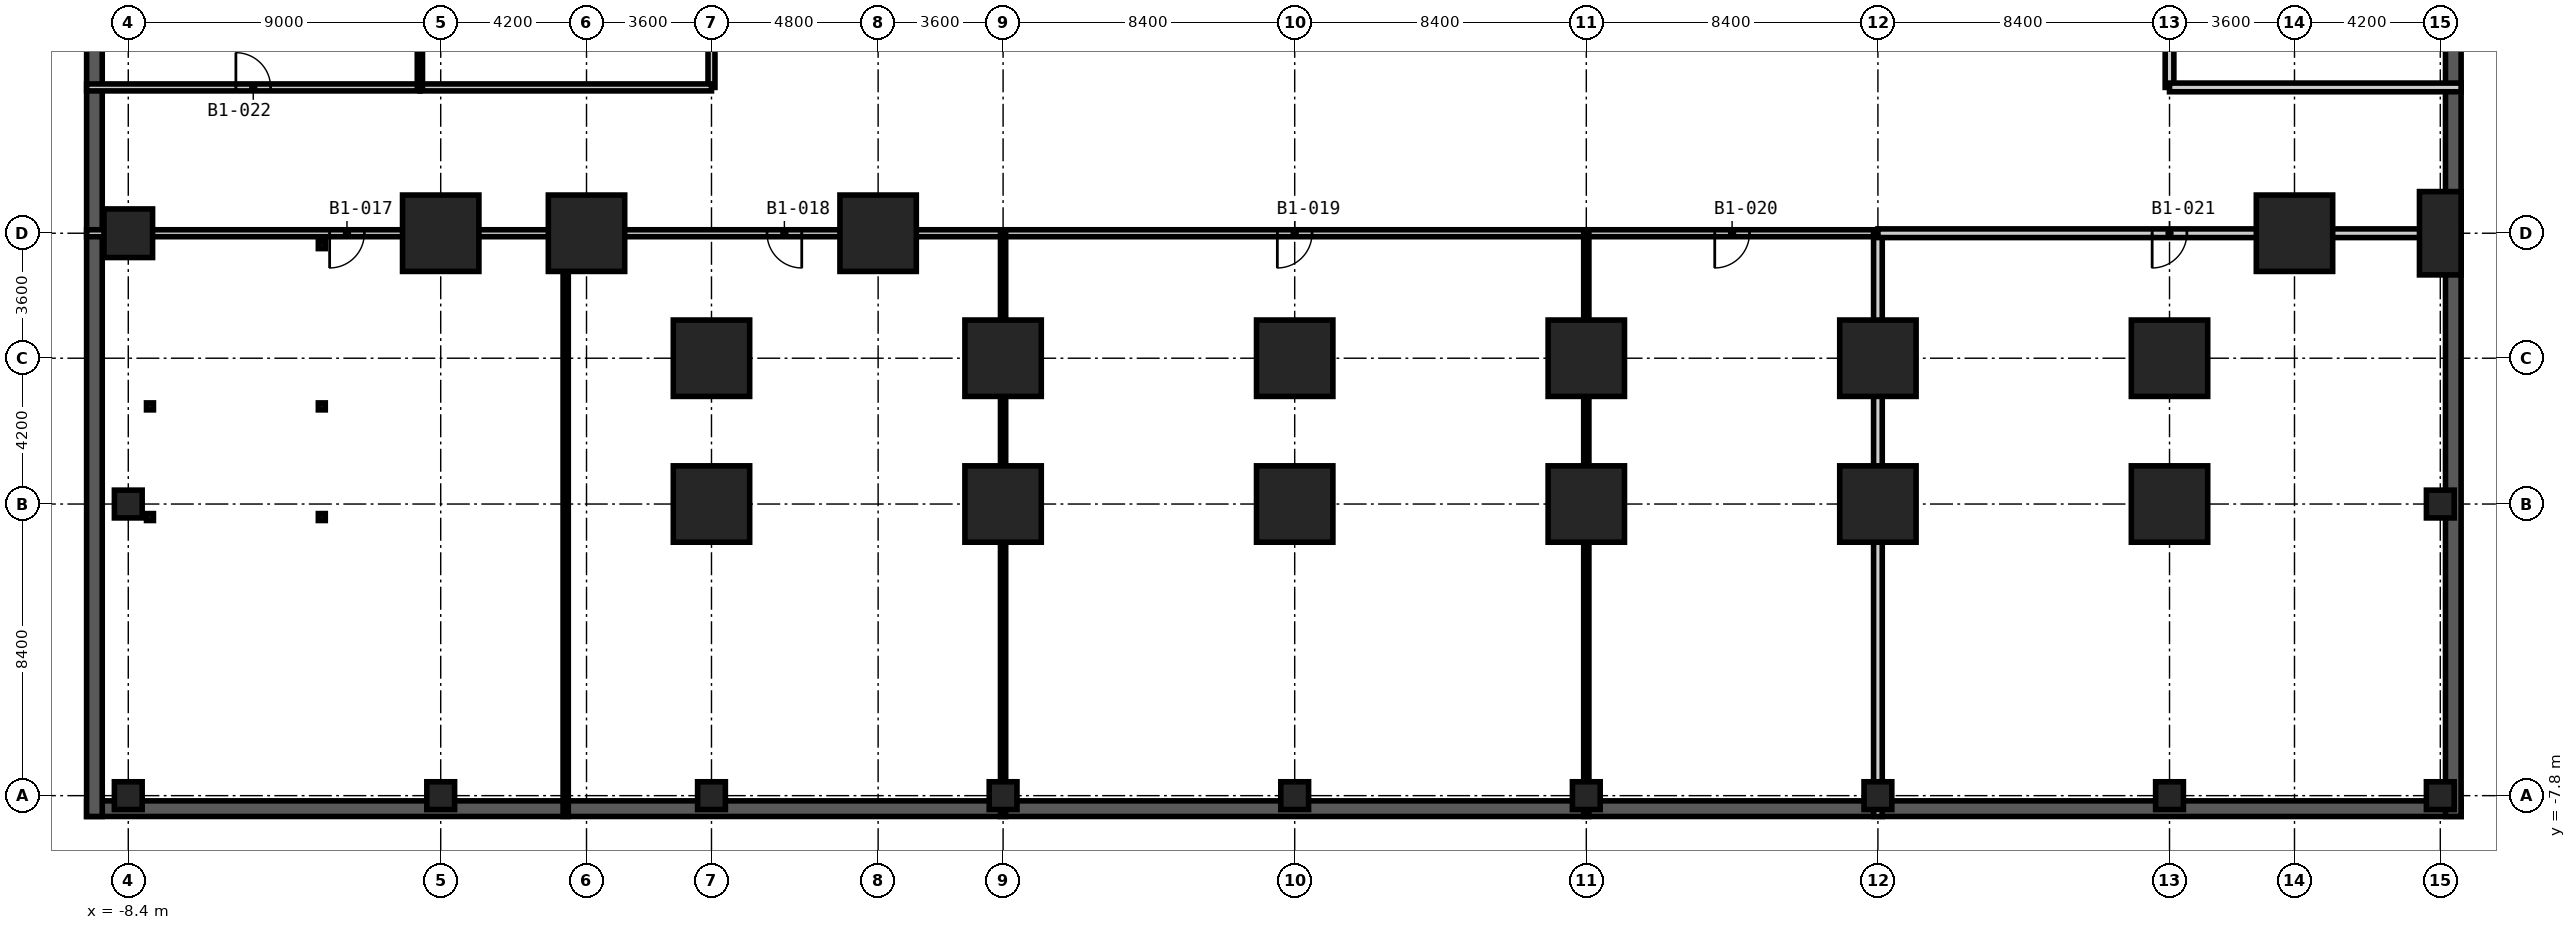
"""IFC4 building model, lengths in metres.
Left out: names, types, materials, properties, quantities, classifications, styles, units other than length and angle.
Written with IfcOpenShell. Run it as: python <this file> out.ifc"""

import sys

from ifc_helpers import new_model, si_unit, direction, frame, frame_2d, origin, origin_2d, place, context, subcontext, project, spatial, rectangle, hollow_rectangle, extrude, element, fill, save


model = new_model("IFC4")
c1 = context("Model", 3, precision=1e-05, world=origin(), true_north=direction((0.0, 1.0)))
c2 = subcontext(c1, "Body", "Model", "MODEL_VIEW")
j1 = project(units=[si_unit("LENGTHUNIT", "METRE"), si_unit("PLANEANGLEUNIT", "RADIAN")], contexts=[c1])
p1 = place(None, origin())
s1 = spatial("IfcSite", under=j1, at=p1, CompositionType="ELEMENT")
p2 = place(p1, origin())
s2 = spatial("IfcBuilding", under=s1, at=p2, CompositionType="ELEMENT")
p3 = place(p2, frame((0.0, 0.0, -5.4)))
s3 = spatial("IfcBuildingStorey", under=s2, at=p3, CompositionType="ELEMENT", Elevation=-5.4)
for number, where, z_axis, x_axis in (
    (1, (0.6, 8.4, 0.0), (0.0, 0.0, 1.0), (1.0, 0.0, 0.0)),
    (2, (4.8, 8.4, 0.0), (0.0, 0.0, 1.0), (1.0, 0.0, 0.0)),
    (3, (8.4, 0.6, 0.0), (0.0, 0.0, 1.0), (1.0, 0.0, 0.0)),
    (4, (8.4, 4.8, 0.0), (0.0, 0.0, 1.0), (1.0, 0.0, 0.0)),
    (5, (13.2, 8.4, 0.0), (0.0, 0.0, 1.0), (1.0, 0.0, 0.0)),
    (6, (16.8, 0.6, 0.0), (0.0, 0.0, 1.0), (1.0, 0.0, 0.0)),
    (7, (16.8, 4.8, 0.0), (0.0, 0.0, 1.0), (1.0, 0.0, 0.0)),
    (8, (25.2, 0.6, 0.0), (0.0, 0.0, 1.0), (1.0, 0.0, 0.0)),
    (9, (25.2, 4.8, 0.0), (0.0, 0.0, 1.0), (1.0, 0.0, 0.0)),
    (10, (33.6, 0.6, 0.0), (0.0, 0.0, 1.0), (1.0, 0.0, 0.0)),
    (11, (33.6, 4.8, 0.0), (0.0, 0.0, 1.0), (1.0, 0.0, 0.0)),
    (12, (42.0, 0.6, 0.0), (0.0, 0.0, 1.0), (1.0, 0.0, 0.0)),
    (13, (42.0, 4.8, 0.0), (0.0, 0.0, 1.0), (1.0, 0.0, 0.0)),
    (14, (50.4, 0.6, 0.0), (0.0, 0.0, 1.0), (1.0, 0.0, 0.0)),
    (15, (50.4, 4.8, 0.0), (0.0, 0.0, 1.0), (1.0, 0.0, 0.0)),
    (16, (54.0, 8.4, 0.0), (0.0, 0.0, 1.0), (1.0, 0.0, 0.0)),
):
    element("IfcColumn", number, at=place(p3, frame(where, z_axis=z_axis, x_axis=x_axis)), inside=s3, PredefinedType="COLUMN", context=c2, shape_type="SweptSolid", body=[
        extrude(rectangle(XDim=2.2, YDim=2.2, at=origin_2d()), origin(), (0.0, 0.0, 1.0), 5.1),
    ])
p4 = place(p3, frame((58.2, 8.4, 0.0), z_axis=(0.0, 0.0, 1.0), x_axis=(1.0, 0.0, 0.0)))
e17 = element("IfcColumn", 17, at=p4, inside=s3, PredefinedType="COLUMN", context=c2, shape_type="SweptSolid", body=[
    extrude(rectangle(XDim=1.2, YDim=2.4, at=origin_2d()), origin(), (0.0, 0.0, 1.0), 5.1),
])
for number, where, z_axis, x_axis in (
    (18, (-8.4, -7.8, -0.3), (0.0, 0.0, 1.0), (1.0, 0.0, 0.0)),
    (19, (-8.4, 0.6, -0.3), (0.0, 0.0, 1.0), (1.0, 0.0, 0.0)),
):
    element("IfcColumn", number, at=place(p3, frame(where, z_axis=z_axis, x_axis=x_axis)), inside=s3, PredefinedType="COLUMN", context=c2, shape_type="SweptSolid", body=[
        extrude(rectangle(XDim=0.8, YDim=0.8, at=origin_2d()), origin(), (0.0, 0.0, 1.0), 5.4),
    ])
p5 = place(p3, frame((-8.4, 8.4, -0.3), z_axis=(0.0, 0.0, 1.0), x_axis=(1.0, 0.0, 0.0)))
e20 = element("IfcColumn", 20, at=p5, inside=s3, PredefinedType="COLUMN", context=c2, shape_type="SweptSolid", body=[
    extrude(rectangle(XDim=1.4, YDim=1.4, at=origin_2d()), origin(), (0.0, 0.0, 1.0), 5.4),
])
for number, where, z_axis, x_axis in (
    (21, (0.6, -7.8, -0.3), (0.0, 0.0, 1.0), (1.0, 0.0, 0.0)),
    (22, (8.4, -7.8, -0.3), (0.0, 0.0, 1.0), (1.0, 0.0, 0.0)),
    (23, (16.8, -7.8, -0.3), (0.0, 0.0, 1.0), (1.0, 0.0, 0.0)),
    (24, (25.2, -7.8, -0.3), (0.0, 0.0, 1.0), (1.0, 0.0, 0.0)),
    (25, (33.6, -7.8, -0.3), (0.0, 0.0, 1.0), (1.0, 0.0, 0.0)),
    (26, (42.0, -7.8, -0.3), (0.0, 0.0, 1.0), (1.0, 0.0, 0.0)),
    (27, (50.4, -7.8, -0.3), (0.0, 0.0, 1.0), (1.0, 0.0, 0.0)),
    (28, (58.2, -7.8, -0.3), (0.0, 0.0, 1.0), (1.0, 0.0, 0.0)),
    (29, (58.2, 0.6, -0.3), (0.0, 0.0, 1.0), (1.0, 0.0, 0.0)),
):
    element("IfcColumn", number, at=place(p3, frame(where, z_axis=z_axis, x_axis=x_axis)), inside=s3, PredefinedType="COLUMN", context=c2, shape_type="SweptSolid", body=[
        extrude(rectangle(XDim=0.8, YDim=0.8, at=origin_2d()), origin(), (0.0, 0.0, 1.0), 5.4),
    ])
p6 = place(p3, frame((-9.6, -8.175, 0.0), z_axis=(0.0, 0.0, 1.0), x_axis=(1.0, 0.0, 0.0)))
e30 = element("IfcWall", 30, at=p6, inside=s3, PredefinedType="SOLIDWALL", context=c2, shape_type="SweptSolid", body=[
    extrude(rectangle(XDim=68.4, YDim=0.45, at=frame_2d((34.2, 0.0))), origin(), (0.0, 0.0, 1.0), 5.1),
])
for number, where, z_axis, x_axis in (
    (31, (58.575, -8.4, 0.0), (0.0, 0.0, 1.0), (0.0, 1.0, 0.0)),
    (32, (-9.375, 58.8, 0.0), (0.0, 0.0, 1.0), (0.0, -1.0, 0.0)),
):
    element("IfcWall", number, at=place(p3, frame(where, z_axis=z_axis, x_axis=x_axis)), inside=s3, PredefinedType="SOLIDWALL", context=c2, shape_type="SweptSolid", body=[
        extrude(rectangle(XDim=67.2, YDim=0.45, at=frame_2d((33.6, 0.0))), origin(), (0.0, 0.0, 1.0), 5.1),
    ])
p7 = place(p3, frame((-9.6, 8.4, 0.0), z_axis=(0.0, 0.0, 1.0), x_axis=(1.0, 0.0, 0.0)))
e33 = element("IfcWall", 33, at=p7, inside=s3, PredefinedType="PARTITIONING", context=c2, shape_type="SweptSolid", body=[
    extrude(rectangle(XDim=51.6, YDim=0.2, at=frame_2d((25.8, 0.0))), origin(), (0.0, 0.0, 1.0), 5.1),
])
p8 = place(p7, frame((7.0, 0.0, 0.0)))
e34 = element("IfcOpeningElement", 34, at=p8, cuts=e33, PredefinedType="OPENING", context=c2, shape_type="SweptSolid", body=[
    extrude(rectangle(XDim=1.0, YDim=2.1, at=frame_2d((0.5, 1.05))), frame((0.0, 0.11, 0.0), z_axis=(0.0, -1.0, 0.0), x_axis=(1.0, 0.0, 0.0)), (0.0, 0.0, 1.0), 0.22),
])
p9 = place(p7, frame((19.6, 0.0, 0.0)))
e35 = element("IfcOpeningElement", 35, at=p9, cuts=e33, PredefinedType="OPENING", context=c2, shape_type="SweptSolid", body=[
    extrude(rectangle(XDim=1.0, YDim=2.1, at=frame_2d((0.5, 1.05))), frame((0.0, 0.11, 0.0), z_axis=(0.0, -1.0, 0.0), x_axis=(1.0, 0.0, 0.0)), (0.0, 0.0, 1.0), 0.22),
])
p10 = place(p7, frame((34.3, 0.0, 0.0)))
e36 = element("IfcOpeningElement", 36, at=p10, cuts=e33, PredefinedType="OPENING", context=c2, shape_type="SweptSolid", body=[
    extrude(rectangle(XDim=1.0, YDim=2.1, at=frame_2d((0.5, 1.05))), frame((0.0, 0.11, 0.0), z_axis=(0.0, -1.0, 0.0), x_axis=(1.0, 0.0, 0.0)), (0.0, 0.0, 1.0), 0.22),
])
p11 = place(p7, frame((46.9, 0.0, 0.0)))
e37 = element("IfcOpeningElement", 37, at=p11, cuts=e33, PredefinedType="OPENING", context=c2, shape_type="SweptSolid", body=[
    extrude(rectangle(XDim=1.0, YDim=2.1, at=frame_2d((0.5, 1.05))), frame((0.0, 0.11, 0.0), z_axis=(0.0, -1.0, 0.0), x_axis=(1.0, 0.0, 0.0)), (0.0, 0.0, 1.0), 0.22),
])
p12 = place(p3, frame((-9.6, 12.6, 0.0), z_axis=(0.0, 0.0, 1.0), x_axis=(1.0, 0.0, 0.0)))
e38 = element("IfcWall", 38, at=p12, inside=s3, PredefinedType="PARTITIONING", context=c2, shape_type="SweptSolid", body=[
    extrude(rectangle(XDim=9.6, YDim=0.2, at=frame_2d((4.8, 0.0))), origin(), (0.0, 0.0, 1.0), 5.1),
])
p13 = place(p12, frame((4.3, 0.0, 0.0)))
e39 = element("IfcOpeningElement", 39, at=p13, cuts=e38, PredefinedType="OPENING", context=c2, shape_type="SweptSolid", body=[
    extrude(rectangle(XDim=1.0, YDim=2.1, at=frame_2d((0.5, 1.05))), frame((0.0, 0.11, 0.0), z_axis=(0.0, -1.0, 0.0), x_axis=(1.0, 0.0, 0.0)), (0.0, 0.0, 1.0), 0.22),
])
p14 = place(p3, frame((8.4, 33.6, 0.0), z_axis=(0.0, 0.0, 1.0), x_axis=(0.0, -1.0, 0.0)))
e40 = element("IfcWall", 40, at=p14, inside=s3, PredefinedType="PARTITIONING", context=c2, shape_type="SweptSolid", body=[
    extrude(rectangle(XDim=21.0, YDim=0.2, at=frame_2d((10.5, 0.0))), origin(), (0.0, 0.0, 1.0), 5.1),
])
p15 = place(p14, frame((10.0, 0.0, 0.0)))
e41 = element("IfcOpeningElement", 41, at=p15, cuts=e40, PredefinedType="OPENING", context=c2, shape_type="SweptSolid", body=[
    extrude(rectangle(XDim=1.0, YDim=2.1, at=frame_2d((0.5, 1.05))), frame((0.0, 0.11, 0.0), z_axis=(0.0, -1.0, 0.0), x_axis=(1.0, 0.0, 0.0)), (0.0, 0.0, 1.0), 0.22),
])
p16 = place(p3, frame((8.4, 12.6, 0.0), z_axis=(0.0, 0.0, 1.0), x_axis=(-1.0, 0.0, 0.0)))
e42 = element("IfcWall", 42, at=p16, inside=s3, PredefinedType="PARTITIONING", context=c2, shape_type="SweptSolid", body=[
    extrude(rectangle(XDim=8.4, YDim=0.2, at=frame_2d((4.2, 0.0))), origin(), (0.0, 0.0, 1.0), 5.1),
])
p17 = place(p3, frame((42.0, -8.4, 0.0), z_axis=(0.0, 0.0, 1.0), x_axis=(0.0, 1.0, 0.0)))
e43 = element("IfcWall", 43, at=p17, inside=s3, PredefinedType="PARTITIONING", context=c2, shape_type="SweptSolid", body=[
    extrude(rectangle(XDim=16.8, YDim=0.25, at=frame_2d((8.4, 0.0))), origin(), (0.0, 0.0, 1.0), 5.1),
])
p18 = place(p3, frame((50.4, 12.6, 0.0), z_axis=(0.0, 0.0, 1.0), x_axis=(0.0, 1.0, 0.0)))
e44 = element("IfcWall", 44, at=p18, inside=s3, PredefinedType="PARTITIONING", context=c2, shape_type="SweptSolid", body=[
    extrude(rectangle(XDim=33.6, YDim=0.25, at=frame_2d((16.8, 0.0))), origin(), (0.0, 0.0, 1.0), 5.1),
])
p19 = place(p18, frame((7.9, 0.0, 0.0)))
e45 = element("IfcOpeningElement", 45, at=p19, cuts=e44, PredefinedType="OPENING", context=c2, shape_type="SweptSolid", body=[
    extrude(rectangle(XDim=1.0, YDim=2.1, at=frame_2d((0.5, 1.05))), frame((0.0, 0.135, 0.0), z_axis=(0.0, -1.0, 0.0), x_axis=(1.0, 0.0, 0.0)), (0.0, 0.0, 1.0), 0.27),
])
p20 = place(p18, frame((24.7, 0.0, 0.0)))
e46 = element("IfcOpeningElement", 46, at=p20, cuts=e44, PredefinedType="OPENING", context=c2, shape_type="SweptSolid", body=[
    extrude(rectangle(XDim=1.0, YDim=2.1, at=frame_2d((0.5, 1.05))), frame((0.0, 0.135, 0.0), z_axis=(0.0, -1.0, 0.0), x_axis=(1.0, 0.0, 0.0)), (0.0, 0.0, 1.0), 0.27),
])
p21 = place(p3, frame((42.0, 8.4, 0.0), z_axis=(0.0, 0.0, 1.0), x_axis=(1.0, 0.0, 0.0)))
e47 = element("IfcWall", 47, at=p21, inside=s3, PredefinedType="PARTITIONING", context=c2, shape_type="SweptSolid", body=[
    extrude(rectangle(XDim=16.8, YDim=0.25, at=frame_2d((8.4, 0.0))), origin(), (0.0, 0.0, 1.0), 5.1),
])
p22 = place(p21, frame((7.9, 0.0, 0.0)))
e48 = element("IfcOpeningElement", 48, at=p22, cuts=e47, PredefinedType="OPENING", context=c2, shape_type="SweptSolid", body=[
    extrude(rectangle(XDim=1.0, YDim=2.1, at=frame_2d((0.5, 1.05))), frame((0.0, 0.135, 0.0), z_axis=(0.0, -1.0, 0.0), x_axis=(1.0, 0.0, 0.0)), (0.0, 0.0, 1.0), 0.27),
])
p23 = place(p3, frame((50.4, 12.6, 0.0), z_axis=(0.0, 0.0, 1.0), x_axis=(1.0, 0.0, 0.0)))
e49 = element("IfcWall", 49, at=p23, inside=s3, PredefinedType="PARTITIONING", context=c2, shape_type="SweptSolid", body=[
    extrude(rectangle(XDim=8.4, YDim=0.25, at=frame_2d((4.2, 0.0))), origin(), (0.0, 0.0, 1.0), 5.1),
])
p24 = place(p3, frame((0.0, 12.6, 0.0), z_axis=(0.0, 0.0, 1.0), x_axis=(0.0, 1.0, 0.0)))
e50 = element("IfcWall", 50, at=p24, inside=s3, PredefinedType="PARTITIONING", context=c2, shape_type="SweptSolid", body=[
    extrude(rectangle(XDim=21.0, YDim=0.15, at=frame_2d((10.5, 0.0))), origin(), (0.0, 0.0, 1.0), 5.1),
])
for number, where, z_axis, x_axis in (
    (51, (4.2, -8.4, 0.0), (0.0, 0.0, 1.0), (0.0, 1.0, 0.0)),
    (52, (16.8, -8.4, 0.0), (0.0, 0.0, 1.0), (0.0, 1.0, 0.0)),
    (53, (33.6, -8.4, 0.0), (0.0, 0.0, 1.0), (0.0, 1.0, 0.0)),
):
    element("IfcWall", number, at=place(p3, frame(where, z_axis=z_axis, x_axis=x_axis)), inside=s3, PredefinedType="PARTITIONING", context=c2, shape_type="SweptSolid", body=[
        extrude(rectangle(XDim=16.8, YDim=0.15, at=frame_2d((8.4, 0.0))), origin(), (0.0, 0.0, 1.0), 5.1),
    ])
for number, where, z_axis, x_axis in (
    (54, (-2.825, 8.058, 0.0), (0.0, 0.0, 1.0), (1.0, 0.0, 0.0)),
    (55, (-7.775, 3.413, 0.0), (0.0, 0.0, 1.0), (1.0, 0.0, 0.0)),
    (56, (-2.825, 3.413, 0.0), (0.0, 0.0, 1.0), (1.0, 0.0, 0.0)),
    (57, (-7.775, 0.225, 0.0), (0.0, 0.0, 1.0), (1.0, 0.0, 0.0)),
    (58, (-2.825, 0.225, 0.0), (0.0, 0.0, 1.0), (1.0, 0.0, 0.0)),
):
    element("IfcColumn", number, at=place(p3, frame(where, z_axis=z_axis, x_axis=x_axis)), inside=s3, PredefinedType="COLUMN", context=c2, shape_type="SweptSolid", body=[
        extrude(hollow_rectangle(XDim=0.2, YDim=0.2, WallThickness=0.01, at=origin_2d()), origin(), (0.0, 0.0, 1.0), 5.1),
    ])
p25 = place(p8, frame((1.0, 0.0, 0.0), z_axis=(0.0, 0.0, 1.0), x_axis=(-1.0, 0.0, 0.0)))
e59 = element("IfcDoor", 59, at=p25, inside=s3, OperationType="SINGLE_SWING_RIGHT", PredefinedType="DOOR", context=c2, shape_type="SweptSolid", body=[
    extrude(rectangle(XDim=1.0, YDim=2.1, at=frame_2d((0.5, 1.05))), frame((0.0, 0.025, 0.0), z_axis=(0.0, -1.0, 0.0), x_axis=(1.0, 0.0, 0.0)), (0.0, 0.0, 1.0), 0.05),
])
fill(e34, e59)
p26 = place(p9, frame((1.0, 0.0, 0.0), z_axis=(0.0, 0.0, 1.0), x_axis=(-1.0, 0.0, 0.0)))
e60 = element("IfcDoor", 60, at=p26, inside=s3, OperationType="SINGLE_SWING_LEFT", PredefinedType="DOOR", context=c2, shape_type="SweptSolid", body=[
    extrude(rectangle(XDim=1.0, YDim=2.1, at=frame_2d((0.5, 1.05))), frame((0.0, 0.025, 0.0), z_axis=(0.0, -1.0, 0.0), x_axis=(1.0, 0.0, 0.0)), (0.0, 0.0, 1.0), 0.05),
])
fill(e35, e60)
p27 = place(p10, frame((1.0, 0.0, 0.0), z_axis=(0.0, 0.0, 1.0), x_axis=(-1.0, 0.0, 0.0)))
e61 = element("IfcDoor", 61, at=p27, inside=s3, OperationType="SINGLE_SWING_RIGHT", PredefinedType="DOOR", context=c2, shape_type="SweptSolid", body=[
    extrude(rectangle(XDim=1.0, YDim=2.1, at=frame_2d((0.5, 1.05))), frame((0.0, 0.025, 0.0), z_axis=(0.0, -1.0, 0.0), x_axis=(1.0, 0.0, 0.0)), (0.0, 0.0, 1.0), 0.05),
])
fill(e36, e61)
p28 = place(p11, frame((1.0, 0.0, 0.0), z_axis=(0.0, 0.0, 1.0), x_axis=(-1.0, 0.0, 0.0)))
e62 = element("IfcDoor", 62, at=p28, inside=s3, OperationType="SINGLE_SWING_RIGHT", PredefinedType="DOOR", context=c2, shape_type="SweptSolid", body=[
    extrude(rectangle(XDim=1.0, YDim=2.1, at=frame_2d((0.5, 1.05))), frame((0.0, 0.025, 0.0), z_axis=(0.0, -1.0, 0.0), x_axis=(1.0, 0.0, 0.0)), (0.0, 0.0, 1.0), 0.05),
])
fill(e37, e62)
p29 = place(p22, frame((1.0, 0.0, 0.0), z_axis=(0.0, 0.0, 1.0), x_axis=(-1.0, 0.0, 0.0)))
e63 = element("IfcDoor", 63, at=p29, inside=s3, OperationType="SINGLE_SWING_RIGHT", PredefinedType="DOOR", context=c2, shape_type="SweptSolid", body=[
    extrude(rectangle(XDim=1.0, YDim=2.1, at=frame_2d((0.5, 1.05))), frame((0.0, 0.025, 0.0), z_axis=(0.0, -1.0, 0.0), x_axis=(1.0, 0.0, 0.0)), (0.0, 0.0, 1.0), 0.05),
])
fill(e48, e63)
p30 = place(p13, origin())
e64 = element("IfcDoor", 64, at=p30, inside=s3, OperationType="SINGLE_SWING_LEFT", PredefinedType="DOOR", context=c2, shape_type="SweptSolid", body=[
    extrude(rectangle(XDim=1.0, YDim=2.1, at=frame_2d((0.5, 1.05))), frame((0.0, 0.025, 0.0), z_axis=(0.0, -1.0, 0.0), x_axis=(1.0, 0.0, 0.0)), (0.0, 0.0, 1.0), 0.05),
])
fill(e39, e64)
save(model, sys.argv[1])
